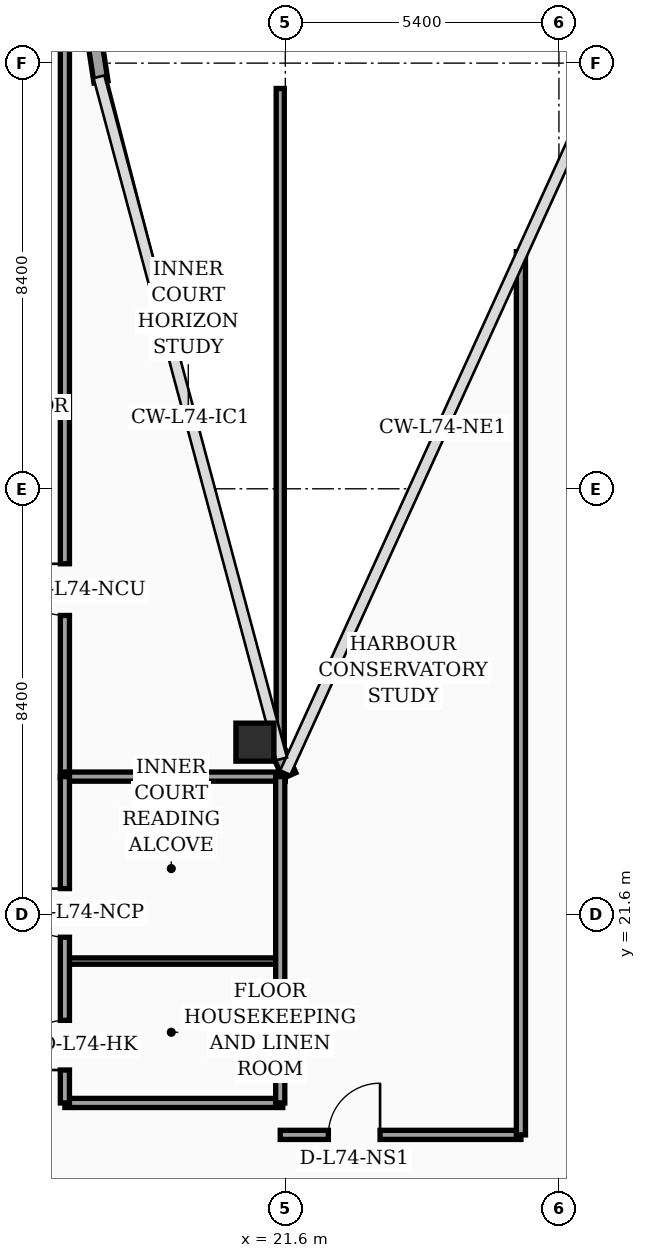
"""IFC4 building model, lengths in metres.
Left out: names, types, materials, properties, quantities, classifications, styles, units other than length and angle.
Written with IfcOpenShell. Run it as: python <this file> out.ifc"""

import sys

from ifc_helpers import new_model, si_unit, direction, frame, frame_2d, origin, origin_2d, place, context, subcontext, project, spatial, rectangle, hollow_rectangle, extrude, element, fill, save


model = new_model("IFC4")
c1 = context("Model", 3, precision=1e-05, world=origin(), true_north=direction((0.0, 1.0)))
c2 = subcontext(c1, "Body", "Model", "MODEL_VIEW")
j1 = project(units=[si_unit("LENGTHUNIT", "METRE"), si_unit("PLANEANGLEUNIT", "RADIAN")], contexts=[c1])
p1 = place(None, origin())
s1 = spatial("IfcSite", under=j1, at=p1, CompositionType="ELEMENT")
p2 = place(p1, origin())
s2 = spatial("IfcBuilding", under=s1, at=p2, CompositionType="ELEMENT")
p3 = place(p2, frame((0.0, 0.0, 298.7)))
s3 = spatial("IfcBuildingStorey", under=s2, at=p3, CompositionType="ELEMENT", Elevation=298.7)
p4 = place(p3, frame((21.0, 25.0, 0.0), z_axis=(0.0, 0.0, 1.0), x_axis=(1.0, 0.0, 0.0)))
e1 = element("IfcColumn", 1, at=p4, inside=s3, PredefinedType="COLUMN", context=c2, shape_type="SweptSolid", body=[
    extrude(hollow_rectangle(XDim=0.75, YDim=0.75, WallThickness=0.032, at=origin_2d()), origin(), (0.0, 0.0, 1.0), 3.56),
])
p5 = place(p3, frame((21.68, 24.34, 0.0), z_axis=(0.0, 0.0, 1.0), x_axis=(-0.40758134973, 0.913168901875, 0.0)))
e2 = element("IfcWall", 2, at=p5, inside=s3, PredefinedType="SOLIDWALL", context=c2, shape_type="SweptSolid", body=[
    extrude(rectangle(XDim=0.471, YDim=0.28, at=frame_2d((0.235, 0.0))), origin(), (0.0, 0.0, 1.0), 3.56),
])
p6 = place(p3, frame((17.962, 38.03, 0.0), z_axis=(0.0, 0.0, 1.0), x_axis=(-0.15141125477, 0.988470855377, 0.0)))
e3 = element("IfcWall", 3, at=p6, inside=s3, PredefinedType="SOLIDWALL", context=c2, shape_type="SweptSolid", body=[
    extrude(rectangle(XDim=0.739, YDim=0.28, at=frame_2d((0.369, 0.0))), origin(), (0.0, 0.0, 1.0), 3.56),
])
p7 = place(p3, frame((17.25, 24.3, 0.0), z_axis=(0.0, 0.0, 1.0), x_axis=(0.0, 1.0, 0.0)))
e4 = element("IfcWall", 4, at=p7, inside=s3, PredefinedType="PARTITIONING", context=c2, shape_type="SweptSolid", body=[
    extrude(rectangle(XDim=18.15, YDim=0.18, at=frame_2d((9.075, 0.0))), origin(), (0.0, 0.0, 1.0), 2.99),
])
p8 = place(p7, frame((3.2, 0.0, 0.0)))
e5 = element("IfcOpeningElement", 5, at=p8, cuts=e4, PredefinedType="OPENING", context=c2, shape_type="SweptSolid", body=[
    extrude(rectangle(XDim=1.02, YDim=2.2, at=frame_2d((0.51, 1.1))), frame((0.0, 0.1, 0.0), z_axis=(0.0, -1.0, 0.0), x_axis=(1.0, 0.0, 0.0)), (0.0, 0.0, 1.0), 0.2),
])
p9 = place(p3, frame((17.25, 17.88, 0.0), z_axis=(0.0, 0.0, 1.0), x_axis=(1.0, 0.0, 0.0)))
e6 = element("IfcWall", 6, at=p9, inside=s3, PredefinedType="PARTITIONING", context=c2, shape_type="SweptSolid", body=[
    extrude(rectangle(XDim=4.3, YDim=0.18, at=frame_2d((2.15, 0.0))), origin(), (0.0, 0.0, 1.0), 3.56),
])
p10 = place(p3, frame((17.25, 20.68, 0.0), z_axis=(0.0, 0.0, 1.0), x_axis=(1.0, 0.0, 0.0)))
e7 = element("IfcWall", 7, at=p10, inside=s3, PredefinedType="PARTITIONING", context=c2, shape_type="SweptSolid", body=[
    extrude(rectangle(XDim=4.3, YDim=0.125, at=frame_2d((2.15, 0.0))), origin(), (0.0, 0.0, 1.0), 3.56),
])
p11 = place(p3, frame((17.25, 24.32, 0.0), z_axis=(0.0, 0.0, 1.0), x_axis=(1.0, 0.0, 0.0)))
e8 = element("IfcWall", 8, at=p11, inside=s3, PredefinedType="PARTITIONING", context=c2, shape_type="SweptSolid", body=[
    extrude(rectangle(XDim=4.35, YDim=0.18, at=frame_2d((2.175, 0.0))), origin(), (0.0, 0.0, 1.0), 3.56),
])
p12 = place(p3, frame((21.5, 17.88, 0.0), z_axis=(0.0, 0.0, 1.0), x_axis=(0.0, 1.0, 0.0)))
e9 = element("IfcWall", 9, at=p12, inside=s3, PredefinedType="PARTITIONING", context=c2, shape_type="SweptSolid", body=[
    extrude(rectangle(XDim=6.44, YDim=0.18, at=frame_2d((3.22, 0.0))), origin(), (0.0, 0.0, 1.0), 3.09),
])
p13 = place(p3, frame((17.25, 17.88, 0.0), z_axis=(0.0, 0.0, 1.0), x_axis=(0.0, 1.0, 0.0)))
e10 = element("IfcWall", 10, at=p13, inside=s3, PredefinedType="PARTITIONING", context=c2, shape_type="SweptSolid", body=[
    extrude(rectangle(XDim=6.44, YDim=0.18, at=frame_2d((3.22, 0.0))), origin(), (0.0, 0.0, 1.0), 3.09),
])
p14 = place(p13, frame((0.65, 0.0, 0.0)))
e11 = element("IfcOpeningElement", 11, at=p14, cuts=e10, PredefinedType="OPENING", context=c2, shape_type="SweptSolid", body=[
    extrude(rectangle(XDim=0.98, YDim=2.15, at=frame_2d((0.49, 1.075))), frame((0.0, 0.1, 0.0), z_axis=(0.0, -1.0, 0.0), x_axis=(1.0, 0.0, 0.0)), (0.0, 0.0, 1.0), 0.2),
])
p15 = place(p13, frame((3.27, 0.0, 0.0)))
e12 = element("IfcOpeningElement", 12, at=p15, cuts=e10, PredefinedType="OPENING", context=c2, shape_type="SweptSolid", body=[
    extrude(rectangle(XDim=0.96, YDim=2.2, at=frame_2d((0.48, 1.1))), frame((0.0, 0.1, 0.0), z_axis=(0.0, -1.0, 0.0), x_axis=(1.0, 0.0, 0.0)), (0.0, 0.0, 1.0), 0.2),
])
p16 = place(p3, frame((21.5, 24.85, 0.0), z_axis=(0.0, 0.0, 1.0), x_axis=(0.0, 1.0, 0.0)))
e13 = element("IfcWall", 13, at=p16, inside=s3, PredefinedType="PARTITIONING", context=c2, shape_type="SweptSolid", body=[
    extrude(rectangle(XDim=13.05, YDim=0.16, at=frame_2d((6.525, 0.0))), origin(), (0.0, 0.0, 1.0), 2.99),
])
p17 = place(p3, frame((21.5, 17.25, 0.0), z_axis=(0.0, 0.0, 1.0), x_axis=(1.0, 0.0, 0.0)))
e14 = element("IfcWall", 14, at=p17, inside=s3, PredefinedType="PARTITIONING", context=c2, shape_type="SweptSolid", body=[
    extrude(rectangle(XDim=4.75, YDim=0.18, at=frame_2d((2.375, 0.0))), origin(), (0.0, 0.0, 1.0), 3.56),
])
p18 = place(p17, frame((0.95, 0.0, 0.0)))
e15 = element("IfcOpeningElement", 15, at=p18, cuts=e14, PredefinedType="OPENING", context=c2, shape_type="SweptSolid", body=[
    extrude(rectangle(XDim=1.02, YDim=2.2, at=frame_2d((0.51, 1.1))), frame((0.0, 0.1, 0.0), z_axis=(0.0, -1.0, 0.0), x_axis=(1.0, 0.0, 0.0)), (0.0, 0.0, 1.0), 0.2),
])
p19 = place(p3, frame((26.25, 17.25, 0.0), z_axis=(0.0, 0.0, 1.0), x_axis=(0.0, 1.0, 0.0)))
e16 = element("IfcWall", 16, at=p19, inside=s3, PredefinedType="PARTITIONING", context=c2, shape_type="SweptSolid", body=[
    extrude(rectangle(XDim=17.43, YDim=0.18, at=frame_2d((8.715, 0.0))), origin(), (0.0, 0.0, 1.0), 3.09),
])
p20 = place(p8, origin())
e17 = element("IfcDoor", 17, at=p20, inside=s3, OperationType="SINGLE_SWING_RIGHT", PredefinedType="DOOR", context=c2, shape_type="SweptSolid", body=[
    extrude(rectangle(XDim=1.02, YDim=2.2, at=frame_2d((0.51, 1.1))), frame((0.0, 0.025, 0.0), z_axis=(0.0, -1.0, 0.0), x_axis=(1.0, 0.0, 0.0)), (0.0, 0.0, 1.0), 0.05),
])
fill(e5, e17)
p21 = place(p14, origin())
e18 = element("IfcDoor", 18, at=p21, inside=s3, OperationType="SINGLE_SWING_LEFT", PredefinedType="DOOR", context=c2, shape_type="SweptSolid", body=[
    extrude(rectangle(XDim=0.98, YDim=2.15, at=frame_2d((0.49, 1.075))), frame((0.0, 0.025, 0.0), z_axis=(0.0, -1.0, 0.0), x_axis=(1.0, 0.0, 0.0)), (0.0, 0.0, 1.0), 0.05),
])
fill(e11, e18)
p22 = place(p15, origin())
e19 = element("IfcDoor", 19, at=p22, inside=s3, OperationType="SINGLE_SWING_RIGHT", PredefinedType="DOOR", context=c2, shape_type="SweptSolid", body=[
    extrude(rectangle(XDim=0.96, YDim=2.2, at=frame_2d((0.48, 1.1))), frame((0.0, 0.025, 0.0), z_axis=(0.0, -1.0, 0.0), x_axis=(1.0, 0.0, 0.0)), (0.0, 0.0, 1.0), 0.05),
])
fill(e12, e19)
p23 = place(p18, origin())
e20 = element("IfcDoor", 20, at=p23, inside=s3, OperationType="SINGLE_SWING_RIGHT", PredefinedType="DOOR", context=c2, shape_type="SweptSolid", body=[
    extrude(rectangle(XDim=1.02, YDim=2.2, at=frame_2d((0.51, 1.1))), frame((0.0, 0.025, 0.0), z_axis=(0.0, -1.0, 0.0), x_axis=(1.0, 0.0, 0.0)), (0.0, 0.0, 1.0), 0.05),
])
fill(e15, e20)
save(model, sys.argv[1])
